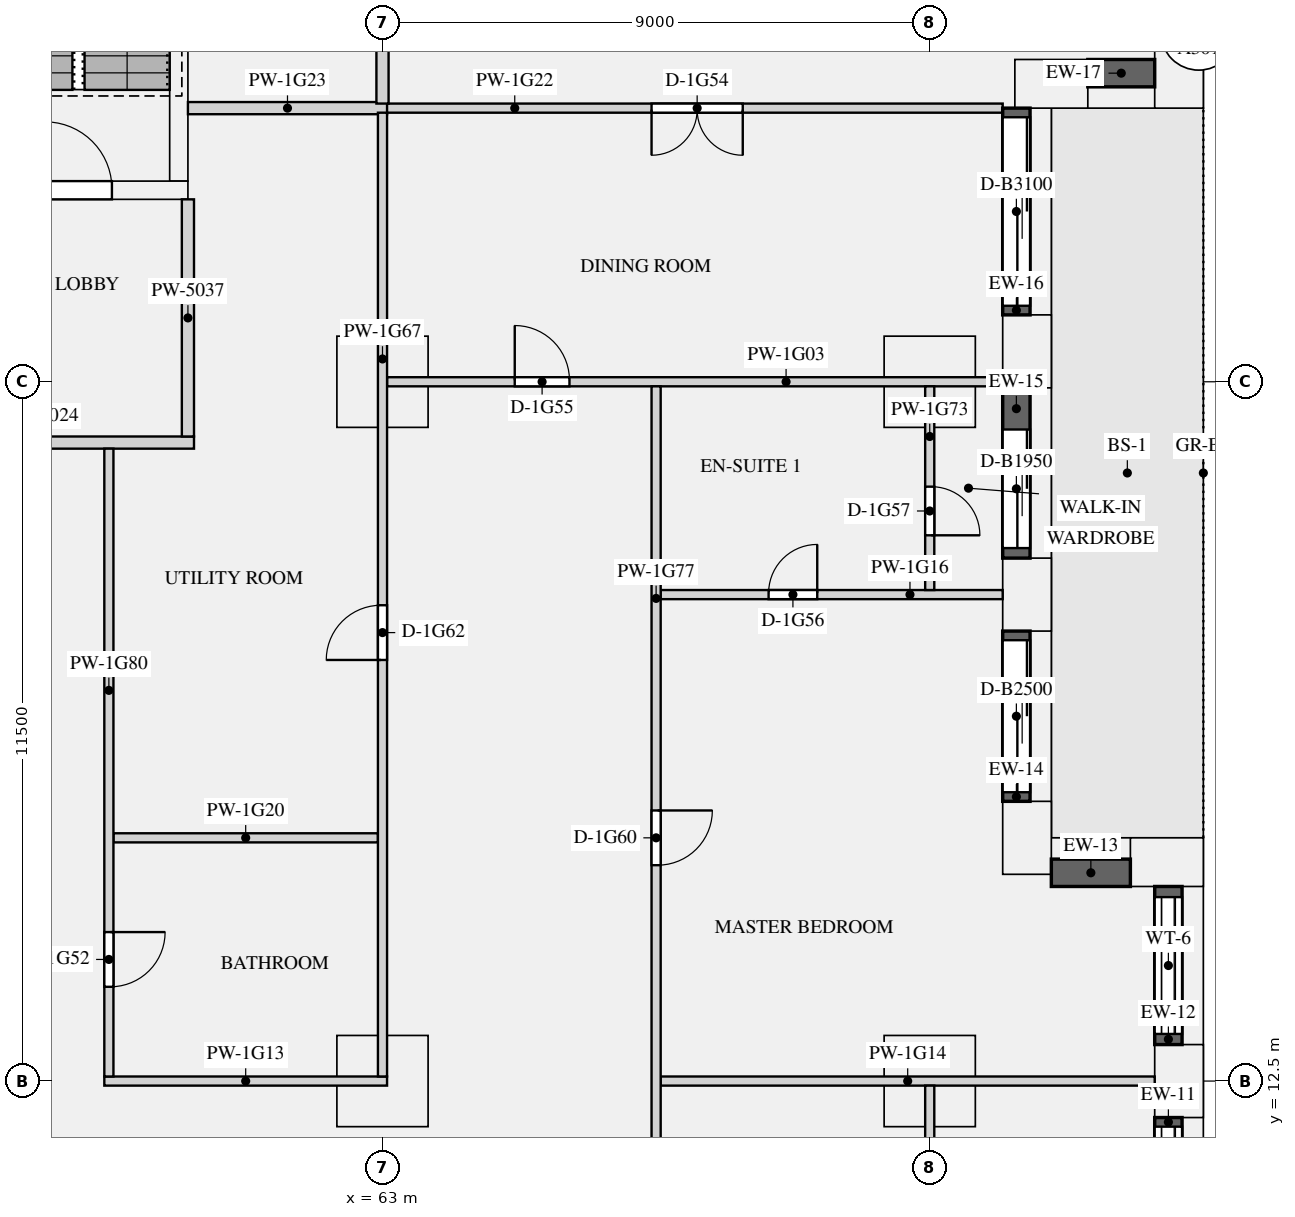
"""IFC4 building model, lengths in metres.
Left out: names, types, materials, properties, quantities, classifications, styles, units other than length and angle.
Written with IfcOpenShell. Run it as: python <this file> out.ifc"""

import sys

from ifc_helpers import new_model, si_unit, direction, frame, frame_2d, origin, origin_2d, place, context, subcontext, project, spatial, rectangle, extrude, element, fill, save


model = new_model("IFC4")
c1 = context("Model", 3, precision=1e-05, world=origin(), true_north=direction((0.0, 1.0)))
c2 = subcontext(c1, "Body", "Model", "MODEL_VIEW")
j1 = project(units=[si_unit("LENGTHUNIT", "METRE"), si_unit("PLANEANGLEUNIT", "RADIAN")], contexts=[c1])
p1 = place(None, origin())
s1 = spatial("IfcSite", under=j1, at=p1, CompositionType="ELEMENT")
p2 = place(p1, origin())
s2 = spatial("IfcBuilding", under=s1, at=p2, CompositionType="ELEMENT")
p3 = place(p2, frame((0.0, 0.0, 66.75)))
s3 = spatial("IfcBuildingStorey", under=s2, at=p3, CompositionType="ELEMENT", Elevation=66.75)
for number, where, z_axis, x_axis in (
    (1, (76.1, 12.5, 0.0), (0.0, 0.0, 1.0), (0.0, 1.0, 0.0)),
    (2, (75.9, 16.1, 0.0), (0.0, 0.0, 1.0), (-1.0, 0.0, 0.0)),
    (3, (73.6, 16.5, 0.0), (0.0, 0.0, 1.0), (0.0, 1.0, 0.0)),
    (4, (73.6, 20.5, 0.0), (0.0, 0.0, 1.0), (0.0, 1.0, 0.0)),
    (5, (73.6, 24.5, 0.0), (0.0, 0.0, 1.0), (0.0, 1.0, 0.0)),
    (6, (74.0, 28.9, 0.0), (0.0, 0.0, 1.0), (1.0, 0.0, 0.0)),
    (7, (76.1, 29.1, 0.0), (0.0, 0.0, 1.0), (0.0, 1.0, 0.0)),
):
    element("IfcColumn", number, at=place(p3, frame(where, z_axis=z_axis, x_axis=x_axis)), inside=s3, PredefinedType="USERDEFINED", context=c2, shape_type="SweptSolid", body=[
        extrude(rectangle(XDim=1.2, YDim=0.8, at=origin_2d()), origin(), (0.0, 0.0, 1.0), 3.15),
    ])
for number, where, z_axis, x_axis in (
    (8, (63.0, 24.0, 0.0), (0.0, 0.0, 1.0), (1.0, 0.0, 0.0)),
    (9, (72.0, 24.0, 0.0), (0.0, 0.0, 1.0), (1.0, 0.0, 0.0)),
    (10, (63.0, 12.5, 0.0), (0.0, 0.0, 1.0), (1.0, 0.0, 0.0)),
    (11, (72.0, 12.5, 0.0), (0.0, 0.0, 1.0), (1.0, 0.0, 0.0)),
):
    element("IfcColumn", number, at=place(p3, frame(where, z_axis=z_axis, x_axis=x_axis)), inside=s3, PredefinedType="COLUMN", context=c2, shape_type="SweptSolid", body=[
        extrude(rectangle(XDim=1.5, YDim=1.5, at=origin_2d()), origin(), (0.0, 0.0, 1.0), 3.15),
    ])
p4 = place(p3, frame((56.2, 27.15, 0.0), z_axis=(0.0, 0.0, 1.0), x_axis=(1.0, 0.0, 0.0)))
e12 = element("IfcWall", 12, at=p4, inside=s3, PredefinedType="SHEAR", context=c2, shape_type="SweptSolid", body=[
    extrude(rectangle(XDim=3.6, YDim=0.3, at=frame_2d((1.8, 0.0))), origin(), (0.0, 0.0, 1.0), 3.15),
])
p5 = place(p4, frame((1.25, 0.0, 0.0)))
e13 = element("IfcOpeningElement", 13, at=p5, cuts=e12, PredefinedType="OPENING", context=c2, shape_type="SweptSolid", body=[
    extrude(rectangle(XDim=1.1, YDim=2.1, at=frame_2d((0.55, 1.05))), frame((0.0, 0.16, 0.0), z_axis=(0.0, -1.0, 0.0), x_axis=(1.0, 0.0, 0.0)), (0.0, 0.0, 1.0), 0.32),
])
p6 = place(p3, frame((59.65, 27.3, 0.0), z_axis=(0.0, 0.0, 1.0), x_axis=(0.0, 1.0, 0.0)))
e14 = element("IfcWall", 14, at=p6, inside=s3, PredefinedType="SHEAR", context=c2, shape_type="SweptSolid", body=[
    extrude(rectangle(XDim=7.8, YDim=0.3, at=frame_2d((3.9, 0.0))), origin(), (0.0, 0.0, 1.0), 3.15),
])
p7 = place(p3, frame((75.925, 9.1, 0.9), z_axis=(0.0, 0.0, 1.0), x_axis=(0.0, 1.0, 0.0)))
e15 = element("IfcWall", 15, at=p7, inside=s3, PredefinedType="SOLIDWALL", context=c2, shape_type="SweptSolid", body=[
    extrude(rectangle(XDim=2.8, YDim=0.45, at=frame_2d((1.4, 0.0))), origin(), (0.0, 0.0, 1.0), 1.93),
])
p8 = place(p7, frame((0.15, 0.0, 0.15)))
e16 = element("IfcOpeningElement", 16, at=p8, cuts=e15, PredefinedType="OPENING", context=c2, shape_type="SweptSolid", body=[
    extrude(rectangle(XDim=2.5, YDim=1.5, at=frame_2d((1.25, 0.75))), frame((0.0, 0.235, 0.0), z_axis=(0.0, -1.0, 0.0), x_axis=(1.0, 0.0, 0.0)), (0.0, 0.0, 1.0), 0.47),
])
p9 = place(p3, frame((75.925, 13.1, 0.9), z_axis=(0.0, 0.0, 1.0), x_axis=(0.0, 1.0, 0.0)))
e17 = element("IfcWall", 17, at=p9, inside=s3, PredefinedType="SOLIDWALL", context=c2, shape_type="SweptSolid", body=[
    extrude(rectangle(XDim=2.6, YDim=0.45, at=frame_2d((1.3, 0.0))), origin(), (0.0, 0.0, 1.0), 1.93),
])
p10 = place(p9, frame((0.175, 0.0, 0.15)))
e18 = element("IfcOpeningElement", 18, at=p10, cuts=e17, PredefinedType="OPENING", context=c2, shape_type="SweptSolid", body=[
    extrude(rectangle(XDim=2.25, YDim=1.5, at=frame_2d((1.125, 0.75))), frame((0.0, 0.235, 0.0), z_axis=(0.0, -1.0, 0.0), x_axis=(1.0, 0.0, 0.0)), (0.0, 0.0, 1.0), 0.47),
])
p11 = place(p3, frame((75.3, 15.925, 0.9), z_axis=(0.0, 0.0, 1.0), x_axis=(-1.0, 0.0, 0.0)))
e19 = element("IfcWall", 19, at=p11, inside=s3, PredefinedType="SOLIDWALL", context=c2, shape_type="SweptSolid", body=[
    extrude(rectangle(XDim=1.3, YDim=0.45, at=frame_2d((0.65, 0.0))), origin(), (0.0, 0.0, 1.0), 1.93),
])
p12 = place(p3, frame((73.425, 17.1, 0.0), z_axis=(0.0, 0.0, 1.0), x_axis=(0.0, 1.0, 0.0)))
e20 = element("IfcWall", 20, at=p12, inside=s3, PredefinedType="SOLIDWALL", context=c2, shape_type="SweptSolid", body=[
    extrude(rectangle(XDim=2.8, YDim=0.45, at=frame_2d((1.4, 0.0))), origin(), (0.0, 0.0, 1.0), 2.83),
])
p13 = place(p12, frame((0.15, 0.0, 0.0)))
e21 = element("IfcOpeningElement", 21, at=p13, cuts=e20, PredefinedType="OPENING", context=c2, shape_type="SweptSolid", body=[
    extrude(rectangle(XDim=2.5, YDim=2.3, at=frame_2d((1.25, 1.15))), frame((0.0, 0.235, 0.0), z_axis=(0.0, -1.0, 0.0), x_axis=(1.0, 0.0, 0.0)), (0.0, 0.0, 1.0), 0.47),
])
p14 = place(p3, frame((73.425, 21.1, 0.0), z_axis=(0.0, 0.0, 1.0), x_axis=(0.0, 1.0, 0.0)))
e22 = element("IfcWall", 22, at=p14, inside=s3, PredefinedType="SOLIDWALL", context=c2, shape_type="SweptSolid", body=[
    extrude(rectangle(XDim=2.8, YDim=0.45, at=frame_2d((1.4, 0.0))), origin(), (0.0, 0.0, 1.0), 2.83),
])
p15 = place(p14, frame((0.165, 0.0, 0.0)))
e23 = element("IfcOpeningElement", 23, at=p15, cuts=e22, PredefinedType="OPENING", context=c2, shape_type="SweptSolid", body=[
    extrude(rectangle(XDim=1.95, YDim=2.3, at=frame_2d((0.975, 1.15))), frame((0.0, 0.235, 0.0), z_axis=(0.0, -1.0, 0.0), x_axis=(1.0, 0.0, 0.0)), (0.0, 0.0, 1.0), 0.47),
])
p16 = place(p3, frame((73.425, 25.1, 0.0), z_axis=(0.0, 0.0, 1.0), x_axis=(0.0, 1.0, 0.0)))
e24 = element("IfcWall", 24, at=p16, inside=s3, PredefinedType="SOLIDWALL", context=c2, shape_type="SweptSolid", body=[
    extrude(rectangle(XDim=3.4, YDim=0.45, at=frame_2d((1.7, 0.0))), origin(), (0.0, 0.0, 1.0), 2.83),
])
p17 = place(p16, frame((0.15, 0.0, 0.0)))
e25 = element("IfcOpeningElement", 25, at=p17, cuts=e24, PredefinedType="OPENING", context=c2, shape_type="SweptSolid", body=[
    extrude(rectangle(XDim=3.1, YDim=2.3, at=frame_2d((1.55, 1.15))), frame((0.0, 0.235, 0.0), z_axis=(0.0, -1.0, 0.0), x_axis=(1.0, 0.0, 0.0)), (0.0, 0.0, 1.0), 0.47),
])
p18 = place(p3, frame((74.6, 29.075, 0.9), z_axis=(0.0, 0.0, 1.0), x_axis=(1.0, 0.0, 0.0)))
e26 = element("IfcWall", 26, at=p18, inside=s3, PredefinedType="SOLIDWALL", context=c2, shape_type="SweptSolid", body=[
    extrude(rectangle(XDim=1.1, YDim=0.45, at=frame_2d((0.55, 0.0))), origin(), (0.0, 0.0, 1.0), 1.93),
])
p19 = place(p3, frame((54.9, 23.0, 0.0), z_axis=(0.0, 0.0, 1.0), x_axis=(1.0, 0.0, 0.0)))
e27 = element("IfcWall", 27, at=p19, inside=s3, PredefinedType="PARTITIONING", context=c2, shape_type="SweptSolid", body=[
    extrude(rectangle(XDim=5.0, YDim=0.2, at=frame_2d((2.5, 0.0))), origin(), (0.0, 0.0, 1.0), 2.83),
])
p20 = place(p3, frame((59.8, 23.1, 0.0), z_axis=(0.0, 0.0, 1.0), x_axis=(0.0, 1.0, 0.0)))
e28 = element("IfcWall", 28, at=p20, inside=s3, PredefinedType="PARTITIONING", context=c2, shape_type="SweptSolid", body=[
    extrude(rectangle(XDim=3.9, YDim=0.2, at=frame_2d((1.95, 0.0))), origin(), (0.0, 0.0, 1.0), 2.83),
])
p21 = place(p3, frame((63.075, 24.0, 0.0), z_axis=(0.0, 0.0, 1.0), x_axis=(1.0, 0.0, 0.0)))
e29 = element("IfcWall", 29, at=p21, inside=s3, PredefinedType="PARTITIONING", context=c2, shape_type="SweptSolid", body=[
    extrude(rectangle(XDim=10.125, YDim=0.15, at=frame_2d((5.062, 0.0))), origin(), (0.0, 0.0, 1.0), 2.83),
])
p22 = place(p21, frame((2.1, 0.0, 0.0)))
e30 = element("IfcOpeningElement", 30, at=p22, cuts=e29, PredefinedType="OPENING", context=c2, shape_type="SweptSolid", body=[
    extrude(rectangle(XDim=0.9, YDim=2.1, at=frame_2d((0.45, 1.05))), frame((0.0, 0.085, 0.0), z_axis=(0.0, -1.0, 0.0), x_axis=(1.0, 0.0, 0.0)), (0.0, 0.0, 1.0), 0.17),
])
p23 = place(p3, frame((58.425, 12.5, 0.0), z_axis=(0.0, 0.0, 1.0), x_axis=(1.0, 0.0, 0.0)))
e31 = element("IfcWall", 31, at=p23, inside=s3, PredefinedType="PARTITIONING", context=c2, shape_type="SweptSolid", body=[
    extrude(rectangle(XDim=4.65, YDim=0.15, at=frame_2d((2.325, 0.0))), origin(), (0.0, 0.0, 1.0), 2.83),
])
p24 = place(p3, frame((67.575, 12.5, 0.0), z_axis=(0.0, 0.0, 1.0), x_axis=(1.0, 0.0, 0.0)))
e32 = element("IfcWall", 32, at=p24, inside=s3, PredefinedType="PARTITIONING", context=c2, shape_type="SweptSolid", body=[
    extrude(rectangle(XDim=8.125, YDim=0.15, at=frame_2d((4.062, 0.0))), origin(), (0.0, 0.0, 1.0), 2.83),
])
p25 = place(p3, frame((67.575, 20.5, 0.0), z_axis=(0.0, 0.0, 1.0), x_axis=(1.0, 0.0, 0.0)))
e33 = element("IfcWall", 33, at=p25, inside=s3, PredefinedType="PARTITIONING", context=c2, shape_type="SweptSolid", body=[
    extrude(rectangle(XDim=5.625, YDim=0.15, at=frame_2d((2.812, 0.0))), origin(), (0.0, 0.0, 1.0), 2.83),
])
p26 = place(p25, frame((1.775, 0.0, 0.0)))
e34 = element("IfcOpeningElement", 34, at=p26, cuts=e33, PredefinedType="OPENING", context=c2, shape_type="SweptSolid", body=[
    extrude(rectangle(XDim=0.8, YDim=2.1, at=frame_2d((0.4, 1.05))), frame((0.0, 0.085, 0.0), z_axis=(0.0, -1.0, 0.0), x_axis=(1.0, 0.0, 0.0)), (0.0, 0.0, 1.0), 0.17),
])
p27 = place(p3, frame((58.575, 16.5, 0.0), z_axis=(0.0, 0.0, 1.0), x_axis=(1.0, 0.0, 0.0)))
e35 = element("IfcWall", 35, at=p27, inside=s3, PredefinedType="PARTITIONING", context=c2, shape_type="SweptSolid", body=[
    extrude(rectangle(XDim=4.35, YDim=0.15, at=frame_2d((2.175, 0.0))), origin(), (0.0, 0.0, 1.0), 2.83),
])
p28 = place(p3, frame((62.925, 28.5, 0.0), z_axis=(0.0, 0.0, 1.0), x_axis=(1.0, 0.0, 0.0)))
e36 = element("IfcWall", 36, at=p28, inside=s3, PredefinedType="PARTITIONING", context=c2, shape_type="SweptSolid", body=[
    extrude(rectangle(XDim=10.275, YDim=0.15, at=frame_2d((5.137, 0.0))), origin(), (0.0, 0.0, 1.0), 2.83),
])
p29 = place(p28, frame((4.5, 0.0, 0.0)))
e37 = element("IfcOpeningElement", 37, at=p29, cuts=e36, PredefinedType="OPENING", context=c2, shape_type="SweptSolid", body=[
    extrude(rectangle(XDim=1.5, YDim=2.1, at=frame_2d((0.75, 1.05))), frame((0.0, 0.085, 0.0), z_axis=(0.0, -1.0, 0.0), x_axis=(1.0, 0.0, 0.0)), (0.0, 0.0, 1.0), 0.17),
])
p30 = place(p3, frame((59.8, 28.5, 0.0), z_axis=(0.0, 0.0, 1.0), x_axis=(1.0, 0.0, 0.0)))
e38 = element("IfcWall", 38, at=p30, inside=s3, PredefinedType="PARTITIONING", context=c2, shape_type="SweptSolid", body=[
    extrude(rectangle(XDim=3.275, YDim=0.2, at=frame_2d((1.637, 0.0))), origin(), (0.0, 0.0, 1.0), 2.83),
])
p31 = place(p3, frame((63.0, 12.575, 0.0), z_axis=(0.0, 0.0, 1.0), x_axis=(0.0, 1.0, 0.0)))
e39 = element("IfcWall", 39, at=p31, inside=s3, PredefinedType="PARTITIONING", context=c2, shape_type="SweptSolid", body=[
    extrude(rectangle(XDim=15.85, YDim=0.15, at=frame_2d((7.925, 0.0))), origin(), (0.0, 0.0, 1.0), 2.83),
])
p32 = place(p31, frame((6.85, 0.0, 0.0)))
e40 = element("IfcOpeningElement", 40, at=p32, cuts=e39, PredefinedType="OPENING", context=c2, shape_type="SweptSolid", body=[
    extrude(rectangle(XDim=0.9, YDim=2.1, at=frame_2d((0.45, 1.05))), frame((0.0, 0.085, 0.0), z_axis=(0.0, -1.0, 0.0), x_axis=(1.0, 0.0, 0.0)), (0.0, 0.0, 1.0), 0.17),
])
p33 = place(p3, frame((63.0, 28.575, 0.0), z_axis=(0.0, 0.0, 1.0), x_axis=(0.0, 1.0, 0.0)))
e41 = element("IfcWall", 41, at=p33, inside=s3, PredefinedType="PARTITIONING", context=c2, shape_type="SweptSolid", body=[
    extrude(rectangle(XDim=3.7, YDim=0.2, at=frame_2d((1.85, 0.0))), origin(), (0.0, 0.0, 1.0), 2.83),
])
p34 = place(p3, frame((72.0, 8.575, 0.0), z_axis=(0.0, 0.0, 1.0), x_axis=(0.0, 1.0, 0.0)))
e42 = element("IfcWall", 42, at=p34, inside=s3, PredefinedType="PARTITIONING", context=c2, shape_type="SweptSolid", body=[
    extrude(rectangle(XDim=3.85, YDim=0.15, at=frame_2d((1.925, 0.0))), origin(), (0.0, 0.0, 1.0), 2.83),
])
p35 = place(p3, frame((72.0, 20.575, 0.0), z_axis=(0.0, 0.0, 1.0), x_axis=(0.0, 1.0, 0.0)))
e43 = element("IfcWall", 43, at=p35, inside=s3, PredefinedType="PARTITIONING", context=c2, shape_type="SweptSolid", body=[
    extrude(rectangle(XDim=3.35, YDim=0.15, at=frame_2d((1.675, 0.0))), origin(), (0.0, 0.0, 1.0), 2.83),
])
p36 = place(p35, frame((0.9, 0.0, 0.0)))
e44 = element("IfcOpeningElement", 44, at=p36, cuts=e43, PredefinedType="OPENING", context=c2, shape_type="SweptSolid", body=[
    extrude(rectangle(XDim=0.8, YDim=2.1, at=frame_2d((0.4, 1.05))), frame((0.0, 0.085, 0.0), z_axis=(0.0, -1.0, 0.0), x_axis=(1.0, 0.0, 0.0)), (0.0, 0.0, 1.0), 0.17),
])
p37 = place(p3, frame((67.5, 8.575, 0.0), z_axis=(0.0, 0.0, 1.0), x_axis=(0.0, 1.0, 0.0)))
e45 = element("IfcWall", 45, at=p37, inside=s3, PredefinedType="PARTITIONING", context=c2, shape_type="SweptSolid", body=[
    extrude(rectangle(XDim=15.35, YDim=0.15, at=frame_2d((7.675, 0.0))), origin(), (0.0, 0.0, 1.0), 2.83),
])
p38 = place(p37, frame((7.475, 0.0, 0.0)))
e46 = element("IfcOpeningElement", 46, at=p38, cuts=e45, PredefinedType="OPENING", context=c2, shape_type="SweptSolid", body=[
    extrude(rectangle(XDim=0.9, YDim=2.1, at=frame_2d((0.45, 1.05))), frame((0.0, 0.085, 0.0), z_axis=(0.0, -1.0, 0.0), x_axis=(1.0, 0.0, 0.0)), (0.0, 0.0, 1.0), 0.17),
])
p39 = place(p37, frame((1.475, 0.0, 0.0)))
e47 = element("IfcOpeningElement", 47, at=p39, cuts=e45, PredefinedType="OPENING", context=c2, shape_type="SweptSolid", body=[
    extrude(rectangle(XDim=0.9, YDim=2.1, at=frame_2d((0.45, 1.05))), frame((0.0, 0.085, 0.0), z_axis=(0.0, -1.0, 0.0), x_axis=(1.0, 0.0, 0.0)), (0.0, 0.0, 1.0), 0.17),
])
p40 = place(p3, frame((58.5, 12.575, 0.0), z_axis=(0.0, 0.0, 1.0), x_axis=(0.0, 1.0, 0.0)))
e48 = element("IfcWall", 48, at=p40, inside=s3, PredefinedType="PARTITIONING", context=c2, shape_type="SweptSolid", body=[
    extrude(rectangle(XDim=10.325, YDim=0.15, at=frame_2d((5.163, 0.0))), origin(), (0.0, 0.0, 1.0), 2.83),
])
p41 = place(p40, frame((1.475, 0.0, 0.0)))
e49 = element("IfcOpeningElement", 49, at=p41, cuts=e48, PredefinedType="OPENING", context=c2, shape_type="SweptSolid", body=[
    extrude(rectangle(XDim=0.9, YDim=2.1, at=frame_2d((0.45, 1.05))), frame((0.0, 0.085, 0.0), z_axis=(0.0, -1.0, 0.0), x_axis=(1.0, 0.0, 0.0)), (0.0, 0.0, 1.0), 0.17),
])
p42 = place(p8, origin())
e50 = element("IfcWindow", 50, at=p42, inside=s3, PartitioningType="SINGLE_PANEL", PredefinedType="WINDOW", context=c2, shape_type="SweptSolid", body=[
    extrude(rectangle(XDim=2.5, YDim=1.5, at=frame_2d((1.25, 0.75))), frame((0.0, -0.065, 0.0), z_axis=(0.0, -1.0, 0.0), x_axis=(1.0, 0.0, 0.0)), (0.0, 0.0, 1.0), 0.06),
])
fill(e16, e50)
p43 = place(p10, origin())
e51 = element("IfcWindow", 51, at=p43, inside=s3, PartitioningType="SINGLE_PANEL", PredefinedType="WINDOW", context=c2, shape_type="SweptSolid", body=[
    extrude(rectangle(XDim=2.25, YDim=1.5, at=frame_2d((1.125, 0.75))), frame((0.0, -0.065, 0.0), z_axis=(0.0, -1.0, 0.0), x_axis=(1.0, 0.0, 0.0)), (0.0, 0.0, 1.0), 0.06),
])
fill(e18, e51)
p44 = place(p13, origin())
e52 = element("IfcDoor", 52, at=p44, inside=s3, OperationType="SLIDING_TO_LEFT", PredefinedType="DOOR", context=c2, shape_type="SweptSolid", body=[
    extrude(rectangle(XDim=2.5, YDim=2.3, at=frame_2d((1.25, 1.15))), frame((0.0, -0.07, 0.0), z_axis=(0.0, -1.0, 0.0), x_axis=(1.0, 0.0, 0.0)), (0.0, 0.0, 1.0), 0.05),
])
fill(e21, e52)
p45 = place(p15, origin())
e53 = element("IfcDoor", 53, at=p45, inside=s3, OperationType="SLIDING_TO_LEFT", PredefinedType="DOOR", context=c2, shape_type="SweptSolid", body=[
    extrude(rectangle(XDim=1.95, YDim=2.3, at=frame_2d((0.975, 1.15))), frame((0.0, -0.07, 0.0), z_axis=(0.0, -1.0, 0.0), x_axis=(1.0, 0.0, 0.0)), (0.0, 0.0, 1.0), 0.05),
])
fill(e23, e53)
p46 = place(p17, origin())
e54 = element("IfcDoor", 54, at=p46, inside=s3, OperationType="SLIDING_TO_LEFT", PredefinedType="DOOR", context=c2, shape_type="SweptSolid", body=[
    extrude(rectangle(XDim=3.1, YDim=2.3, at=frame_2d((1.55, 1.15))), frame((0.0, -0.07, 0.0), z_axis=(0.0, -1.0, 0.0), x_axis=(1.0, 0.0, 0.0)), (0.0, 0.0, 1.0), 0.05),
])
fill(e25, e54)
p47 = place(p5, origin())
e55 = element("IfcDoor", 55, at=p47, inside=s3, OperationType="SINGLE_SWING_LEFT", PredefinedType="DOOR", context=c2, shape_type="SweptSolid", body=[
    extrude(rectangle(XDim=1.1, YDim=2.1, at=frame_2d((0.55, 1.05))), frame((0.0, 0.025, 0.0), z_axis=(0.0, -1.0, 0.0), x_axis=(1.0, 0.0, 0.0)), (0.0, 0.0, 1.0), 0.05),
])
fill(e13, e55)
p48 = place(p41, frame((0.9, 0.0, 0.0), z_axis=(0.0, 0.0, 1.0), x_axis=(-1.0, 0.0, 0.0)))
e56 = element("IfcDoor", 56, at=p48, inside=s3, OperationType="SINGLE_SWING_LEFT", PredefinedType="DOOR", context=c2, shape_type="SweptSolid", body=[
    extrude(rectangle(XDim=0.9, YDim=2.1, at=frame_2d((0.45, 1.05))), frame((0.0, 0.025, 0.0), z_axis=(0.0, -1.0, 0.0), x_axis=(1.0, 0.0, 0.0)), (0.0, 0.0, 1.0), 0.05),
])
fill(e49, e56)
p49 = place(p29, frame((1.5, 0.0, 0.0), z_axis=(0.0, 0.0, 1.0), x_axis=(-1.0, 0.0, 0.0)))
e57 = element("IfcDoor", 57, at=p49, inside=s3, OperationType="DOUBLE_DOOR_SINGLE_SWING", PredefinedType="DOOR", context=c2, shape_type="SweptSolid", body=[
    extrude(rectangle(XDim=1.5, YDim=2.1, at=frame_2d((0.75, 1.05))), frame((0.0, 0.025, 0.0), z_axis=(0.0, -1.0, 0.0), x_axis=(1.0, 0.0, 0.0)), (0.0, 0.0, 1.0), 0.05),
])
fill(e37, e57)
p50 = place(p22, origin())
e58 = element("IfcDoor", 58, at=p50, inside=s3, OperationType="SINGLE_SWING_LEFT", PredefinedType="DOOR", context=c2, shape_type="SweptSolid", body=[
    extrude(rectangle(XDim=0.9, YDim=2.1, at=frame_2d((0.45, 1.05))), frame((0.0, 0.025, 0.0), z_axis=(0.0, -1.0, 0.0), x_axis=(1.0, 0.0, 0.0)), (0.0, 0.0, 1.0), 0.05),
])
fill(e30, e58)
p51 = place(p26, origin())
e59 = element("IfcDoor", 59, at=p51, inside=s3, OperationType="SINGLE_SWING_RIGHT", PredefinedType="DOOR", context=c2, shape_type="SweptSolid", body=[
    extrude(rectangle(XDim=0.8, YDim=2.1, at=frame_2d((0.4, 1.05))), frame((0.0, 0.025, 0.0), z_axis=(0.0, -1.0, 0.0), x_axis=(1.0, 0.0, 0.0)), (0.0, 0.0, 1.0), 0.05),
])
fill(e34, e59)
p52 = place(p36, frame((0.8, 0.0, 0.0), z_axis=(0.0, 0.0, 1.0), x_axis=(-1.0, 0.0, 0.0)))
e60 = element("IfcDoor", 60, at=p52, inside=s3, OperationType="SINGLE_SWING_RIGHT", PredefinedType="DOOR", context=c2, shape_type="SweptSolid", body=[
    extrude(rectangle(XDim=0.8, YDim=2.1, at=frame_2d((0.4, 1.05))), frame((0.0, 0.025, 0.0), z_axis=(0.0, -1.0, 0.0), x_axis=(1.0, 0.0, 0.0)), (0.0, 0.0, 1.0), 0.05),
])
fill(e44, e60)
p53 = place(p38, frame((0.9, 0.0, 0.0), z_axis=(0.0, 0.0, 1.0), x_axis=(-1.0, 0.0, 0.0)))
e61 = element("IfcDoor", 61, at=p53, inside=s3, OperationType="SINGLE_SWING_LEFT", PredefinedType="DOOR", context=c2, shape_type="SweptSolid", body=[
    extrude(rectangle(XDim=0.9, YDim=2.1, at=frame_2d((0.45, 1.05))), frame((0.0, 0.025, 0.0), z_axis=(0.0, -1.0, 0.0), x_axis=(1.0, 0.0, 0.0)), (0.0, 0.0, 1.0), 0.05),
])
fill(e46, e61)
p54 = place(p32, origin())
e62 = element("IfcDoor", 62, at=p54, inside=s3, OperationType="SINGLE_SWING_LEFT", PredefinedType="DOOR", context=c2, shape_type="SweptSolid", body=[
    extrude(rectangle(XDim=0.9, YDim=2.1, at=frame_2d((0.45, 1.05))), frame((0.0, 0.025, 0.0), z_axis=(0.0, -1.0, 0.0), x_axis=(1.0, 0.0, 0.0)), (0.0, 0.0, 1.0), 0.05),
])
fill(e40, e62)
save(model, sys.argv[1])
